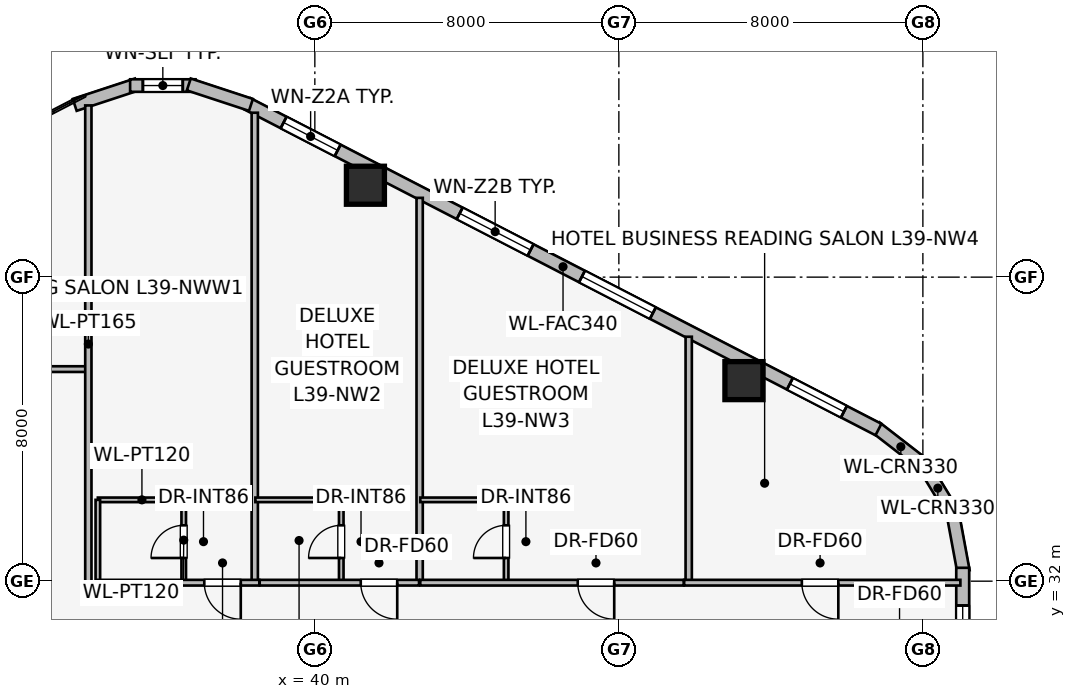
"""IFC4 building model, lengths in metres.
Left out: names, types, materials, properties, quantities, classifications, styles, units other than length and angle.
Written with IfcOpenShell. Run it as: python <this file> out.ifc"""

import sys

from ifc_helpers import new_model, si_unit, direction, frame, frame_2d, origin, origin_2d, place, context, subcontext, project, spatial, rectangle, extrude, element, fill, save


model = new_model("IFC4")
c1 = context("Model", 3, precision=1e-05, world=origin(), true_north=direction((0.0, 1.0)))
c2 = subcontext(c1, "Body", "Model", "MODEL_VIEW")
j1 = project(units=[si_unit("LENGTHUNIT", "METRE"), si_unit("PLANEANGLEUNIT", "RADIAN")], contexts=[c1])
p1 = place(None, origin())
s1 = spatial("IfcSite", under=j1, at=p1, CompositionType="ELEMENT")
p2 = place(p1, origin())
s2 = spatial("IfcBuilding", under=s1, at=p2, CompositionType="ELEMENT")
p3 = place(p2, frame((0.0, 0.0, 146.4)))
s3 = spatial("IfcBuildingStorey", under=s2, at=p3, CompositionType="ELEMENT", Elevation=146.4)
for number, where, z_axis, x_axis in (
    (1, (51.291, 37.277, 0.0), (0.0, 0.0, 1.0), (1.0, 0.0, 0.0)),
    (2, (41.331, 42.418, 0.0), (0.0, 0.0, 1.0), (1.0, 0.0, 0.0)),
):
    element("IfcColumn", number, at=place(p3, frame(where, z_axis=z_axis, x_axis=x_axis)), inside=s3, PredefinedType="COLUMN", context=c2, shape_type="SweptSolid", body=[
        extrude(rectangle(XDim=1.0, YDim=1.0, at=origin_2d()), origin(), (0.0, 0.0, 1.0), 3.45),
    ])
p4 = place(p3, frame((54.757, 36.05, 0.0), z_axis=(0.0, 0.0, 1.0), x_axis=(0.790621329885, -0.612305408053, 0.0)))
e3 = element("IfcWall", 3, at=p4, inside=s3, PredefinedType="STANDARD", context=c2, shape_type="SweptSolid", body=[
    extrude(rectangle(XDim=1.676, YDim=0.33, at=frame_2d((0.838, 0.0))), origin(), (0.0, 0.0, 1.0), 3.19),
])
p5 = place(p3, frame((55.957, 35.164, 0.0), z_axis=(0.0, 0.0, 1.0), x_axis=(0.520519429557, -0.853849824883, 0.0)))
e4 = element("IfcWall", 4, at=p5, inside=s3, PredefinedType="STANDARD", context=c2, shape_type="SweptSolid", body=[
    extrude(rectangle(XDim=1.677, YDim=0.33, at=frame_2d((0.839, 0.0))), origin(), (0.0, 0.0, 1.0), 3.19),
])
p6 = place(p3, frame((56.763, 33.907, 0.0), z_axis=(0.0, 0.0, 1.0), x_axis=(0.181984991895, -0.983301308209, 0.0)))
e5 = element("IfcWall", 5, at=p6, inside=s3, PredefinedType="STANDARD", context=c2, shape_type="SweptSolid", body=[
    extrude(rectangle(XDim=1.677, YDim=0.33, at=frame_2d((0.838, 0.0))), origin(), (0.0, 0.0, 1.0), 3.19),
])
p7 = place(p3, frame((38.231, 44.558, 0.0), z_axis=(0.0, 0.0, 1.0), x_axis=(0.888613612362, -0.458656568606, 0.0)))
e6 = element("IfcWall", 6, at=p7, inside=s3, PredefinedType="STANDARD", context=c2, shape_type="SweptSolid", body=[
    extrude(rectangle(XDim=18.681, YDim=0.34, at=frame_2d((9.34, 0.0))), origin(), (0.0, 0.0, 1.0), 3.19),
])
p8 = place(p7, frame((1.066, 0.0, 0.75)))
e7 = element("IfcOpeningElement", 7, at=p8, cuts=e6, PredefinedType="OPENING", context=c2, shape_type="SweptSolid", body=[
    extrude(rectangle(XDim=1.6, YDim=1.55, at=frame_2d((0.8, 0.775))), frame((0.0, 0.18, 0.0), z_axis=(0.0, -1.0, 0.0), x_axis=(1.0, 0.0, 0.0)), (0.0, 0.0, 1.0), 0.36),
])
p9 = place(p7, frame((6.28, 0.0, 0.75)))
e8 = element("IfcOpeningElement", 8, at=p9, cuts=e6, PredefinedType="OPENING", context=c2, shape_type="SweptSolid", body=[
    extrude(rectangle(XDim=2.1, YDim=1.5, at=frame_2d((1.05, 0.75))), frame((0.0, 0.18, 0.0), z_axis=(0.0, -1.0, 0.0), x_axis=(1.0, 0.0, 0.0)), (0.0, 0.0, 1.0), 0.36),
])
p10 = place(p7, frame((9.901, 0.0, 0.75)))
e9 = element("IfcOpeningElement", 9, at=p10, cuts=e6, PredefinedType="OPENING", context=c2, shape_type="SweptSolid", body=[
    extrude(rectangle(XDim=2.1, YDim=1.5, at=frame_2d((1.05, 0.75))), frame((0.0, 0.18, 0.0), z_axis=(0.0, -1.0, 0.0), x_axis=(1.0, 0.0, 0.0)), (0.0, 0.0, 1.0), 0.36),
])
p11 = place(p7, frame((16.058, 0.0, 0.75)))
e10 = element("IfcOpeningElement", 10, at=p11, cuts=e6, PredefinedType="OPENING", context=c2, shape_type="SweptSolid", body=[
    extrude(rectangle(XDim=1.6, YDim=1.55, at=frame_2d((0.8, 0.775))), frame((0.0, 0.18, 0.0), z_axis=(0.0, -1.0, 0.0), x_axis=(1.0, 0.0, 0.0)), (0.0, 0.0, 1.0), 0.36),
])
p12 = place(p3, frame((33.681, 44.532, 0.0), z_axis=(0.0, 0.0, 1.0), x_axis=(0.949937416267, 0.312440242569, 0.0)))
e11 = element("IfcWall", 11, at=p12, inside=s3, PredefinedType="STANDARD", context=c2, shape_type="SweptSolid", body=[
    extrude(rectangle(XDim=1.722, YDim=0.33, at=frame_2d((0.861, 0.0))), origin(), (0.0, 0.0, 1.0), 3.19),
])
p13 = place(p3, frame((35.139, 45.041, 0.0), z_axis=(0.0, 0.0, 1.0), x_axis=(1.0, 0.0, 0.0)))
e12 = element("IfcWall", 12, at=p13, inside=s3, PredefinedType="STANDARD", context=c2, shape_type="SweptSolid", body=[
    extrude(rectangle(XDim=1.722, YDim=0.33, at=frame_2d((0.861, 0.0))), origin(), (0.0, 0.0, 1.0), 3.19),
])
p14 = place(p13, frame((0.336, 0.0, 0.75)))
e13 = element("IfcOpeningElement", 13, at=p14, cuts=e12, PredefinedType="OPENING", context=c2, shape_type="SweptSolid", body=[
    extrude(rectangle(XDim=1.05, YDim=1.4, at=frame_2d((0.525, 0.7))), frame((0.0, 0.175, 0.0), z_axis=(0.0, -1.0, 0.0), x_axis=(1.0, 0.0, 0.0)), (0.0, 0.0, 1.0), 0.35),
])
p15 = place(p3, frame((36.683, 45.07, 0.0), z_axis=(0.0, 0.0, 1.0), x_axis=(0.949937416267, -0.312440242569, 0.0)))
e14 = element("IfcWall", 14, at=p15, inside=s3, PredefinedType="STANDARD", context=c2, shape_type="SweptSolid", body=[
    extrude(rectangle(XDim=1.722, YDim=0.33, at=frame_2d((0.861, 0.0))), origin(), (0.0, 0.0, 1.0), 3.19),
])
p16 = place(p3, frame((57.048, 32.352, 0.0), z_axis=(0.0, 0.0, 1.0), x_axis=(0.0, -1.0, 0.0)))
e15 = element("IfcWall", 15, at=p16, inside=s3, PredefinedType="STANDARD", context=c2, shape_type="SweptSolid", body=[
    extrude(rectangle(XDim=16.704, YDim=0.34, at=frame_2d((8.352, 0.0))), origin(), (0.0, 0.0, 1.0), 3.19),
])
p17 = place(p16, frame((0.992, 0.0, 0.75)))
e16 = element("IfcOpeningElement", 16, at=p17, cuts=e15, PredefinedType="OPENING", context=c2, shape_type="SweptSolid", body=[
    extrude(rectangle(XDim=1.05, YDim=1.4, at=frame_2d((0.525, 0.7))), frame((0.0, 0.18, 0.0), z_axis=(0.0, -1.0, 0.0), x_axis=(1.0, 0.0, 0.0)), (0.0, 0.0, 1.0), 0.36),
])
p18 = place(p16, frame((4.935, 0.0, 0.75)))
e17 = element("IfcOpeningElement", 17, at=p18, cuts=e15, PredefinedType="OPENING", context=c2, shape_type="SweptSolid", body=[
    extrude(rectangle(XDim=2.1, YDim=1.5, at=frame_2d((1.05, 0.75))), frame((0.0, 0.18, 0.0), z_axis=(0.0, -1.0, 0.0), x_axis=(1.0, 0.0, 0.0)), (0.0, 0.0, 1.0), 0.36),
])
p19 = place(p16, frame((9.919, 0.0, 0.75)))
e18 = element("IfcOpeningElement", 18, at=p19, cuts=e15, PredefinedType="OPENING", context=c2, shape_type="SweptSolid", body=[
    extrude(rectangle(XDim=1.6, YDim=1.55, at=frame_2d((0.8, 0.775))), frame((0.0, 0.18, 0.0), z_axis=(0.0, -1.0, 0.0), x_axis=(1.0, 0.0, 0.0)), (0.0, 0.0, 1.0), 0.36),
])
p20 = place(p16, frame((14.702, 0.0, 0.75)))
e19 = element("IfcOpeningElement", 19, at=p20, cuts=e15, PredefinedType="OPENING", context=c2, shape_type="SweptSolid", body=[
    extrude(rectangle(XDim=1.05, YDim=1.4, at=frame_2d((0.525, 0.7))), frame((0.0, 0.18, 0.0), z_axis=(0.0, -1.0, 0.0), x_axis=(1.0, 0.0, 0.0)), (0.0, 0.0, 1.0), 0.36),
])
p21 = place(p3, frame((34.0, 37.58, 0.0), z_axis=(0.0, 0.0, 1.0), x_axis=(-1.0, 0.0, 0.0)))
e20 = element("IfcWall", 20, at=p21, inside=s3, PredefinedType="PARTITIONING", context=c2, shape_type="SweptSolid", body=[
    extrude(rectangle(XDim=13.707, YDim=0.15, at=frame_2d((6.854, 0.0))), origin(), (0.0, 0.0, 1.0), 2.657),
])
p22 = place(p21, frame((5.195, 0.0, 0.0)))
e21 = element("IfcOpeningElement", 21, at=p22, cuts=e20, PredefinedType="OPENING", context=c2, shape_type="SweptSolid", body=[
    extrude(rectangle(XDim=0.96, YDim=2.0, at=frame_2d((0.48, 1.0))), frame((0.0, 0.085, 0.0), z_axis=(0.0, -1.0, 0.0), x_axis=(1.0, 0.0, 0.0)), (0.0, 0.0, 1.0), 0.17),
])
p23 = place(p3, frame((34.04, 31.96, 0.0), z_axis=(0.0, 0.0, 1.0), x_axis=(0.0, 1.0, 0.0)))
e22 = element("IfcWall", 22, at=p23, inside=s3, PredefinedType="PARTITIONING", context=c2, shape_type="SweptSolid", body=[
    extrude(rectangle(XDim=12.558, YDim=0.165, at=frame_2d((6.279, 0.0))), origin(), (0.0, 0.0, 1.0), 3.19),
])
p24 = place(p3, frame((38.419, 31.97, 0.0), z_axis=(0.0, 0.0, 1.0), x_axis=(0.0, 1.0, 0.0)))
e23 = element("IfcWall", 23, at=p24, inside=s3, PredefinedType="PARTITIONING", context=c2, shape_type="SweptSolid", body=[
    extrude(rectangle(XDim=12.356, YDim=0.165, at=frame_2d((6.178, 0.0))), origin(), (0.0, 0.0, 1.0), 3.19),
])
p25 = place(p3, frame((42.758, 31.97, 0.0), z_axis=(0.0, 0.0, 1.0), x_axis=(0.0, 1.0, 0.0)))
e24 = element("IfcWall", 24, at=p25, inside=s3, PredefinedType="PARTITIONING", context=c2, shape_type="SweptSolid", body=[
    extrude(rectangle(XDim=10.116, YDim=0.165, at=frame_2d((5.058, 0.0))), origin(), (0.0, 0.0, 1.0), 3.19),
])
p26 = place(p3, frame((49.838, 31.97, 0.0), z_axis=(0.0, 0.0, 1.0), x_axis=(0.0, 1.0, 0.0)))
e25 = element("IfcWall", 25, at=p26, inside=s3, PredefinedType="PARTITIONING", context=c2, shape_type="SweptSolid", body=[
    extrude(rectangle(XDim=6.462, YDim=0.165, at=frame_2d((3.231, 0.0))), origin(), (0.0, 0.0, 1.0), 3.19),
])
p27 = place(p3, frame((36.55, 31.96, 0.0), z_axis=(0.0, 0.0, 1.0), x_axis=(0.0, 1.0, 0.0)))
e26 = element("IfcWall", 26, at=p27, inside=s3, PredefinedType="PARTITIONING", context=c2, shape_type="SweptSolid", body=[
    extrude(rectangle(XDim=2.24, YDim=0.12, at=frame_2d((1.12, 0.0))), origin(), (0.0, 0.0, 1.0), 3.19),
])
p28 = place(p27, frame((0.65, 0.0, 0.0)))
e27 = element("IfcOpeningElement", 27, at=p28, cuts=e26, PredefinedType="OPENING", context=c2, shape_type="SweptSolid", body=[
    extrude(rectangle(XDim=0.86, YDim=2.0, at=frame_2d((0.43, 1.0))), frame((0.0, 0.07, 0.0), z_axis=(0.0, -1.0, 0.0), x_axis=(1.0, 0.0, 0.0)), (0.0, 0.0, 1.0), 0.14),
])
p29 = place(p3, frame((36.61, 34.14, 0.0), z_axis=(0.0, 0.0, 1.0), x_axis=(-1.0, 0.0, 0.0)))
e28 = element("IfcWall", 28, at=p29, inside=s3, PredefinedType="PARTITIONING", context=c2, shape_type="SweptSolid", body=[
    extrude(rectangle(XDim=2.32, YDim=0.12, at=frame_2d((1.16, 0.0))), origin(), (0.0, 0.0, 1.0), 3.19),
])
p30 = place(p3, frame((34.29, 34.14, 0.0), z_axis=(0.0, 0.0, 1.0), x_axis=(0.0, -1.0, 0.0)))
e29 = element("IfcWall", 29, at=p30, inside=s3, PredefinedType="PARTITIONING", context=c2, shape_type="SweptSolid", body=[
    extrude(rectangle(XDim=2.14, YDim=0.12, at=frame_2d((1.07, 0.0))), origin(), (0.0, 0.0, 1.0), 3.19),
])
p31 = place(p3, frame((38.539, 31.96, 0.0), z_axis=(0.0, 0.0, 1.0), x_axis=(-1.0, 0.0, 0.0)))
e30 = element("IfcWall", 30, at=p31, inside=s3, PredefinedType="PARTITIONING", context=c2, shape_type="SweptSolid", body=[
    extrude(rectangle(XDim=4.249, YDim=0.15, at=frame_2d((2.125, 0.0))), origin(), (0.0, 0.0, 1.0), 3.19),
])
p32 = place(p31, frame((0.488, 0.0, 0.0)))
e31 = element("IfcOpeningElement", 31, at=p32, cuts=e30, PredefinedType="OPENING", context=c2, shape_type="SweptSolid", body=[
    extrude(rectangle(XDim=0.96, YDim=2.0, at=frame_2d((0.48, 1.0))), frame((0.0, 0.085, 0.0), z_axis=(0.0, -1.0, 0.0), x_axis=(1.0, 0.0, 0.0)), (0.0, 0.0, 1.0), 0.17),
])
p33 = place(p3, frame((40.695, 31.96, 0.0), z_axis=(0.0, 0.0, 1.0), x_axis=(0.0, 1.0, 0.0)))
e32 = element("IfcWall", 32, at=p33, inside=s3, PredefinedType="PARTITIONING", context=c2, shape_type="SweptSolid", body=[
    extrude(rectangle(XDim=2.24, YDim=0.12, at=frame_2d((1.12, 0.0))), origin(), (0.0, 0.0, 1.0), 3.19),
])
p34 = place(p33, frame((0.65, 0.0, 0.0)))
e33 = element("IfcOpeningElement", 33, at=p34, cuts=e32, PredefinedType="OPENING", context=c2, shape_type="SweptSolid", body=[
    extrude(rectangle(XDim=0.86, YDim=2.0, at=frame_2d((0.43, 1.0))), frame((0.0, 0.07, 0.0), z_axis=(0.0, -1.0, 0.0), x_axis=(1.0, 0.0, 0.0)), (0.0, 0.0, 1.0), 0.14),
])
p35 = place(p3, frame((40.755, 34.14, 0.0), z_axis=(0.0, 0.0, 1.0), x_axis=(-1.0, 0.0, 0.0)))
e34 = element("IfcWall", 34, at=p35, inside=s3, PredefinedType="PARTITIONING", context=c2, shape_type="SweptSolid", body=[
    extrude(rectangle(XDim=2.32, YDim=0.12, at=frame_2d((1.16, 0.0))), origin(), (0.0, 0.0, 1.0), 3.19),
])
p36 = place(p3, frame((42.742, 31.96, 0.0), z_axis=(0.0, 0.0, 1.0), x_axis=(-1.0, 0.0, 0.0)))
e35 = element("IfcWall", 35, at=p36, inside=s3, PredefinedType="PARTITIONING", context=c2, shape_type="SweptSolid", body=[
    extrude(rectangle(XDim=4.193, YDim=0.15, at=frame_2d((2.096, 0.0))), origin(), (0.0, 0.0, 1.0), 3.19),
])
p37 = place(p36, frame((0.574, 0.0, 0.0)))
e36 = element("IfcOpeningElement", 36, at=p37, cuts=e35, PredefinedType="OPENING", context=c2, shape_type="SweptSolid", body=[
    extrude(rectangle(XDim=0.96, YDim=2.0, at=frame_2d((0.48, 1.0))), frame((0.0, 0.085, 0.0), z_axis=(0.0, -1.0, 0.0), x_axis=(1.0, 0.0, 0.0)), (0.0, 0.0, 1.0), 0.17),
])
p38 = place(p3, frame((45.034, 31.96, 0.0), z_axis=(0.0, 0.0, 1.0), x_axis=(0.0, 1.0, 0.0)))
e37 = element("IfcWall", 37, at=p38, inside=s3, PredefinedType="PARTITIONING", context=c2, shape_type="SweptSolid", body=[
    extrude(rectangle(XDim=2.24, YDim=0.12, at=frame_2d((1.12, 0.0))), origin(), (0.0, 0.0, 1.0), 3.19),
])
p39 = place(p38, frame((0.65, 0.0, 0.0)))
e38 = element("IfcOpeningElement", 38, at=p39, cuts=e37, PredefinedType="OPENING", context=c2, shape_type="SweptSolid", body=[
    extrude(rectangle(XDim=0.86, YDim=2.0, at=frame_2d((0.43, 1.0))), frame((0.0, 0.07, 0.0), z_axis=(0.0, -1.0, 0.0), x_axis=(1.0, 0.0, 0.0)), (0.0, 0.0, 1.0), 0.14),
])
p40 = place(p3, frame((45.094, 34.14, 0.0), z_axis=(0.0, 0.0, 1.0), x_axis=(-1.0, 0.0, 0.0)))
e39 = element("IfcWall", 39, at=p40, inside=s3, PredefinedType="PARTITIONING", context=c2, shape_type="SweptSolid", body=[
    extrude(rectangle(XDim=2.32, YDim=0.12, at=frame_2d((1.16, 0.0))), origin(), (0.0, 0.0, 1.0), 3.19),
])
p41 = place(p3, frame((49.708, 31.96, 0.0), z_axis=(0.0, 0.0, 1.0), x_axis=(-1.0, 0.0, 0.0)))
e40 = element("IfcWall", 40, at=p41, inside=s3, PredefinedType="PARTITIONING", context=c2, shape_type="SweptSolid", body=[
    extrude(rectangle(XDim=6.934, YDim=0.15, at=frame_2d((3.467, 0.0))), origin(), (0.0, 0.0, 1.0), 3.19),
])
p42 = place(p41, frame((1.83, 0.0, 0.0)))
e41 = element("IfcOpeningElement", 41, at=p42, cuts=e40, PredefinedType="OPENING", context=c2, shape_type="SweptSolid", body=[
    extrude(rectangle(XDim=0.96, YDim=2.0, at=frame_2d((0.48, 1.0))), frame((0.0, 0.085, 0.0), z_axis=(0.0, -1.0, 0.0), x_axis=(1.0, 0.0, 0.0)), (0.0, 0.0, 1.0), 0.17),
])
p43 = place(p3, frame((56.987, 31.96, 0.0), z_axis=(0.0, 0.0, 1.0), x_axis=(-1.0, 0.0, 0.0)))
e42 = element("IfcWall", 42, at=p43, inside=s3, PredefinedType="PARTITIONING", context=c2, shape_type="SweptSolid", body=[
    extrude(rectangle(XDim=7.269, YDim=0.15, at=frame_2d((3.635, 0.0))), origin(), (0.0, 0.0, 1.0), 3.19),
])
p44 = place(p43, frame((3.212, 0.0, 0.0)))
e43 = element("IfcOpeningElement", 43, at=p44, cuts=e42, PredefinedType="OPENING", context=c2, shape_type="SweptSolid", body=[
    extrude(rectangle(XDim=0.96, YDim=2.0, at=frame_2d((0.48, 1.0))), frame((0.0, 0.085, 0.0), z_axis=(0.0, -1.0, 0.0), x_axis=(1.0, 0.0, 0.0)), (0.0, 0.0, 1.0), 0.17),
])
p45 = place(p8, origin())
e44 = element("IfcWindow", 44, at=p45, inside=s3, PartitioningType="SINGLE_PANEL", PredefinedType="WINDOW", context=c2, shape_type="SweptSolid", body=[
    extrude(rectangle(XDim=1.6, YDim=1.55, at=frame_2d((0.8, 0.775))), frame((0.0, 0.03, 0.0), z_axis=(0.0, -1.0, 0.0), x_axis=(1.0, 0.0, 0.0)), (0.0, 0.0, 1.0), 0.06),
])
fill(e7, e44)
p46 = place(p9, origin())
e45 = element("IfcWindow", 45, at=p46, inside=s3, PartitioningType="SINGLE_PANEL", PredefinedType="WINDOW", context=c2, shape_type="SweptSolid", body=[
    extrude(rectangle(XDim=2.1, YDim=1.5, at=frame_2d((1.05, 0.75))), frame((0.0, 0.03, 0.0), z_axis=(0.0, -1.0, 0.0), x_axis=(1.0, 0.0, 0.0)), (0.0, 0.0, 1.0), 0.06),
])
fill(e8, e45)
p47 = place(p10, origin())
e46 = element("IfcWindow", 46, at=p47, inside=s3, PartitioningType="SINGLE_PANEL", PredefinedType="WINDOW", context=c2, shape_type="SweptSolid", body=[
    extrude(rectangle(XDim=2.1, YDim=1.5, at=frame_2d((1.05, 0.75))), frame((0.0, 0.03, 0.0), z_axis=(0.0, -1.0, 0.0), x_axis=(1.0, 0.0, 0.0)), (0.0, 0.0, 1.0), 0.06),
])
fill(e9, e46)
p48 = place(p11, origin())
e47 = element("IfcWindow", 47, at=p48, inside=s3, PartitioningType="SINGLE_PANEL", PredefinedType="WINDOW", context=c2, shape_type="SweptSolid", body=[
    extrude(rectangle(XDim=1.6, YDim=1.55, at=frame_2d((0.8, 0.775))), frame((0.0, 0.03, 0.0), z_axis=(0.0, -1.0, 0.0), x_axis=(1.0, 0.0, 0.0)), (0.0, 0.0, 1.0), 0.06),
])
fill(e10, e47)
p49 = place(p14, origin())
e48 = element("IfcWindow", 48, at=p49, inside=s3, PartitioningType="SINGLE_PANEL", PredefinedType="WINDOW", context=c2, shape_type="SweptSolid", body=[
    extrude(rectangle(XDim=1.05, YDim=1.4, at=frame_2d((0.525, 0.7))), frame((0.0, 0.03, 0.0), z_axis=(0.0, -1.0, 0.0), x_axis=(1.0, 0.0, 0.0)), (0.0, 0.0, 1.0), 0.06),
])
fill(e13, e48)
p50 = place(p17, origin())
e49 = element("IfcWindow", 49, at=p50, inside=s3, PartitioningType="SINGLE_PANEL", PredefinedType="WINDOW", context=c2, shape_type="SweptSolid", body=[
    extrude(rectangle(XDim=1.05, YDim=1.4, at=frame_2d((0.525, 0.7))), frame((0.0, 0.03, 0.0), z_axis=(0.0, -1.0, 0.0), x_axis=(1.0, 0.0, 0.0)), (0.0, 0.0, 1.0), 0.06),
])
fill(e16, e49)
p51 = place(p28, origin())
e50 = element("IfcDoor", 50, at=p51, inside=s3, OperationType="SINGLE_SWING_LEFT", PredefinedType="DOOR", context=c2, shape_type="SweptSolid", body=[
    extrude(rectangle(XDim=0.86, YDim=2.0, at=frame_2d((0.43, 1.0))), frame((0.0, 0.025, 0.0), z_axis=(0.0, -1.0, 0.0), x_axis=(1.0, 0.0, 0.0)), (0.0, 0.0, 1.0), 0.05),
])
fill(e27, e50)
p52 = place(p32, origin())
e51 = element("IfcDoor", 51, at=p52, inside=s3, OperationType="SINGLE_SWING_LEFT", PredefinedType="DOOR", context=c2, shape_type="SweptSolid", body=[
    extrude(rectangle(XDim=0.96, YDim=2.0, at=frame_2d((0.48, 1.0))), frame((0.0, 0.025, 0.0), z_axis=(0.0, -1.0, 0.0), x_axis=(1.0, 0.0, 0.0)), (0.0, 0.0, 1.0), 0.05),
])
fill(e31, e51)
p53 = place(p34, origin())
e52 = element("IfcDoor", 52, at=p53, inside=s3, OperationType="SINGLE_SWING_LEFT", PredefinedType="DOOR", context=c2, shape_type="SweptSolid", body=[
    extrude(rectangle(XDim=0.86, YDim=2.0, at=frame_2d((0.43, 1.0))), frame((0.0, 0.025, 0.0), z_axis=(0.0, -1.0, 0.0), x_axis=(1.0, 0.0, 0.0)), (0.0, 0.0, 1.0), 0.05),
])
fill(e33, e52)
p54 = place(p37, origin())
e53 = element("IfcDoor", 53, at=p54, inside=s3, OperationType="SINGLE_SWING_LEFT", PredefinedType="DOOR", context=c2, shape_type="SweptSolid", body=[
    extrude(rectangle(XDim=0.96, YDim=2.0, at=frame_2d((0.48, 1.0))), frame((0.0, 0.025, 0.0), z_axis=(0.0, -1.0, 0.0), x_axis=(1.0, 0.0, 0.0)), (0.0, 0.0, 1.0), 0.05),
])
fill(e36, e53)
p55 = place(p39, origin())
e54 = element("IfcDoor", 54, at=p55, inside=s3, OperationType="SINGLE_SWING_LEFT", PredefinedType="DOOR", context=c2, shape_type="SweptSolid", body=[
    extrude(rectangle(XDim=0.86, YDim=2.0, at=frame_2d((0.43, 1.0))), frame((0.0, 0.025, 0.0), z_axis=(0.0, -1.0, 0.0), x_axis=(1.0, 0.0, 0.0)), (0.0, 0.0, 1.0), 0.05),
])
fill(e38, e54)
p56 = place(p42, origin())
e55 = element("IfcDoor", 55, at=p56, inside=s3, OperationType="SINGLE_SWING_LEFT", PredefinedType="DOOR", context=c2, shape_type="SweptSolid", body=[
    extrude(rectangle(XDim=0.96, YDim=2.0, at=frame_2d((0.48, 1.0))), frame((0.0, 0.025, 0.0), z_axis=(0.0, -1.0, 0.0), x_axis=(1.0, 0.0, 0.0)), (0.0, 0.0, 1.0), 0.05),
])
fill(e41, e55)
p57 = place(p44, origin())
e56 = element("IfcDoor", 56, at=p57, inside=s3, OperationType="SINGLE_SWING_LEFT", PredefinedType="DOOR", context=c2, shape_type="SweptSolid", body=[
    extrude(rectangle(XDim=0.96, YDim=2.0, at=frame_2d((0.48, 1.0))), frame((0.0, 0.025, 0.0), z_axis=(0.0, -1.0, 0.0), x_axis=(1.0, 0.0, 0.0)), (0.0, 0.0, 1.0), 0.05),
])
fill(e43, e56)
save(model, sys.argv[1])
